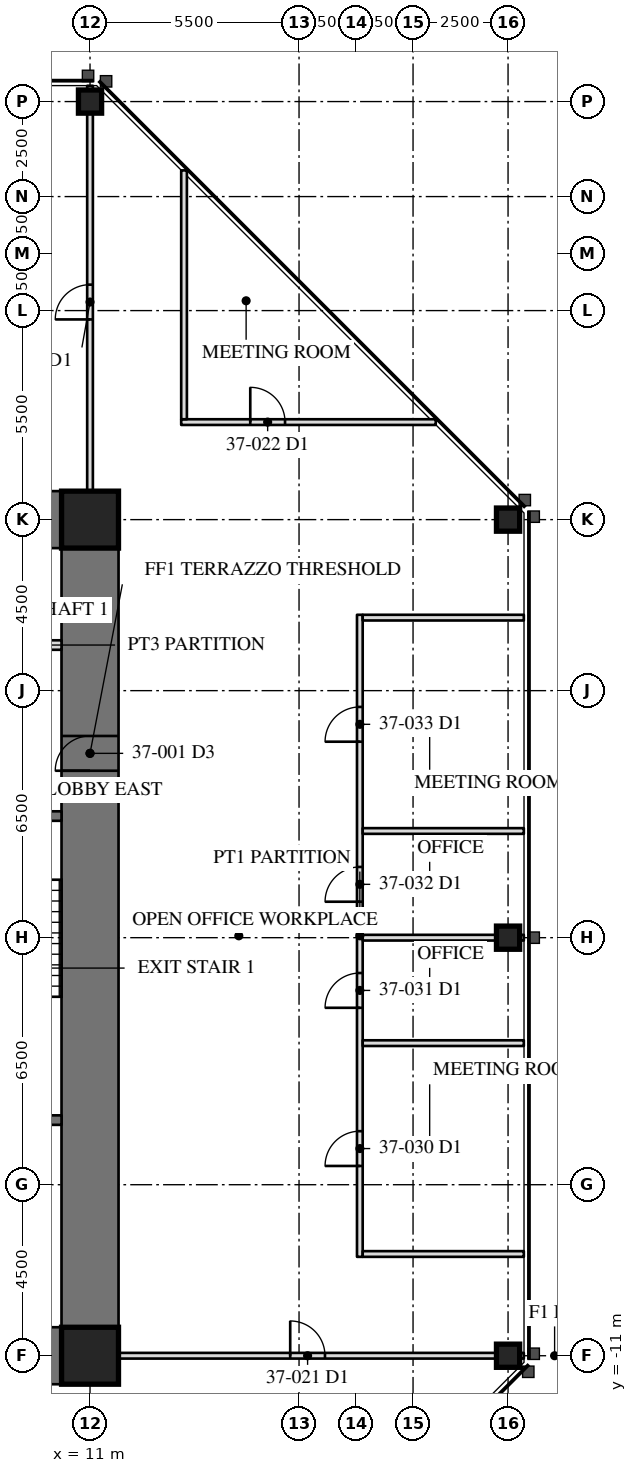
"""IFC4 building model, lengths in metres.
Left out: names, types, materials, properties, quantities, classifications, styles, units other than length and angle.
Written with IfcOpenShell. Run it as: python <this file> out.ifc"""

import sys

from ifc_helpers import new_model, si_unit, direction, frame, frame_2d, origin, origin_2d, place, context, subcontext, project, spatial, rectangle, hollow_rectangle, extrude, element, fill, save


model = new_model("IFC4")
c1 = context("Model", 3, precision=1e-05, world=origin(), true_north=direction((0.0, 1.0)))
c2 = subcontext(c1, "Body", "Model", "MODEL_VIEW")
j1 = project(units=[si_unit("LENGTHUNIT", "METRE"), si_unit("PLANEANGLEUNIT", "RADIAN")], contexts=[c1])
p1 = place(None, origin())
s1 = spatial("IfcSite", under=j1, at=p1, CompositionType="ELEMENT")
p2 = place(p1, origin())
s2 = spatial("IfcBuilding", under=s1, at=p2, CompositionType="ELEMENT")
p3 = place(p2, frame((0.0, 0.0, 158.2)))
s3 = spatial("IfcBuildingStorey", under=s2, at=p3, CompositionType="ELEMENT", Elevation=158.2)
for number, where, z_axis, x_axis in (
    (1, (22.0, -11.0, 0.0), (0.0, 0.0, 1.0), (0.0, 1.0, 0.0)),
    (2, (22.0, 0.0, 0.0), (0.0, 0.0, 1.0), (0.0, 1.0, 0.0)),
    (3, (22.0, 11.0, 0.0), (0.0, 0.0, 1.0), (0.0, 1.0, 0.0)),
    (4, (11.0, 22.0, 0.0), (0.0, 0.0, 1.0), (1.0, 0.0, 0.0)),
):
    element("IfcColumn", number, at=place(p3, frame(where, z_axis=z_axis, x_axis=x_axis)), inside=s3, PredefinedType="COLUMN", context=c2, shape_type="SweptSolid", body=[
        extrude(hollow_rectangle(XDim=0.61, YDim=0.61, WallThickness=0.076, at=origin_2d()), origin(), (0.0, 0.0, 1.0), 4.1),
    ])
p4 = place(p3, frame((11.0, -11.0, 0.0), z_axis=(0.0, 0.0, 1.0), x_axis=(0.0, 1.0, 0.0)))
e5 = element("IfcWall", 5, at=p4, inside=s3, PredefinedType="SHEAR", context=c2, shape_type="SweptSolid", body=[
    extrude(rectangle(XDim=22.0, YDim=1.5, at=frame_2d((11.0, 0.0))), origin(), (0.0, 0.0, 1.0), 4.1),
])
p5 = place(p4, frame((15.393, 0.0, 0.0)))
e6 = element("IfcOpeningElement", 6, at=p5, cuts=e5, PredefinedType="OPENING", context=c2, shape_type="SweptSolid", body=[
    extrude(rectangle(XDim=0.915, YDim=2.134, at=frame_2d((0.458, 1.067))), frame((0.0, 0.76, 0.0), z_axis=(0.0, -1.0, 0.0), x_axis=(1.0, 0.0, 0.0)), (0.0, 0.0, 1.0), 1.52),
])
for number, where, z_axis, x_axis in (
    (7, (11.0, 11.0, 0.0), (0.0, 0.0, 1.0), (-1.0, 0.0, 0.0)),
    (8, (6.5, -11.0, 0.0), (0.0, 0.0, 1.0), (1.0, 0.0, 0.0)),
):
    element("IfcWall", number, at=place(p3, frame(where, z_axis=z_axis, x_axis=x_axis)), inside=s3, PredefinedType="SHEAR", context=c2, shape_type="SweptSolid", body=[
        extrude(rectangle(XDim=4.5, YDim=1.5, at=frame_2d((2.25, 0.0))), origin(), (0.0, 0.0, 1.0), 4.1),
    ])
for number, where, z_axis, x_axis in (
    (9, (11.0, 11.0, 0.0), (0.0, 0.0, 1.0), (1.0, 0.0, 0.0)),
    (10, (11.0, -11.0, 0.0), (0.0, 0.0, 1.0), (1.0, 0.0, 0.0)),
):
    element("IfcColumn", number, at=place(p3, frame(where, z_axis=z_axis, x_axis=x_axis)), inside=s3, PredefinedType="COLUMN", context=c2, shape_type="SweptSolid", body=[
        extrude(hollow_rectangle(XDim=1.499, YDim=1.499, WallThickness=0.102, at=origin_2d()), origin(), (0.0, 0.0, 1.0), 4.1),
    ])
p6 = place(p3, frame((6.95, -4.8, 0.0), z_axis=(0.0, 0.0, 1.0), x_axis=(1.0, 0.0, 0.0)))
e11 = element("IfcWall", 11, at=p6, inside=s3, PredefinedType="SOLIDWALL", context=c2, shape_type="SweptSolid", body=[
    extrude(rectangle(XDim=3.3, YDim=0.25, at=frame_2d((1.65, 0.0))), origin(), (0.0, 0.0, 1.0), 3.91),
])
p7 = place(p3, frame((6.95, 3.2, 0.0), z_axis=(0.0, 0.0, 1.0), x_axis=(1.0, 0.0, 0.0)))
e12 = element("IfcWall", 12, at=p7, inside=s3, PredefinedType="SOLIDWALL", context=c2, shape_type="SweptSolid", body=[
    extrude(rectangle(XDim=3.3, YDim=0.25, at=frame_2d((1.65, 0.0))), origin(), (0.0, 0.0, 1.0), 3.91),
])
p8 = place(p7, frame((1.116, 0.0, 0.0)))
e13 = element("IfcOpeningElement", 13, at=p8, cuts=e12, PredefinedType="OPENING", context=c2, shape_type="SweptSolid", body=[
    extrude(rectangle(XDim=1.067, YDim=2.134, at=frame_2d((0.533, 1.067))), frame((0.0, 0.135, 0.0), z_axis=(0.0, -1.0, 0.0), x_axis=(1.0, 0.0, 0.0)), (0.0, 0.0, 1.0), 0.27),
])
p9 = place(p3, frame((6.95, 7.7, 0.0), z_axis=(0.0, 0.0, 1.0), x_axis=(1.0, 0.0, 0.0)))
e14 = element("IfcWall", 14, at=p9, inside=s3, PredefinedType="PARTITIONING", context=c2, shape_type="SweptSolid", body=[
    extrude(rectangle(XDim=3.3, YDim=0.25, at=frame_2d((1.65, 0.0))), origin(), (0.0, 0.0, 1.0), 3.91),
])
p10 = place(p9, frame((0.45, 0.0, 0.0)))
e15 = element("IfcOpeningElement", 15, at=p10, cuts=e14, PredefinedType="OPENING", context=c2, shape_type="SweptSolid", body=[
    extrude(rectangle(XDim=1.219, YDim=2.134, at=frame_2d((0.609, 1.067))), frame((0.0, 0.135, 0.0), z_axis=(0.0, -1.0, 0.0), x_axis=(1.0, 0.0, 0.0)), (0.0, 0.0, 1.0), 0.27),
])
p11 = place(p3, frame((11.0, 11.75, 0.0), z_axis=(0.0, 0.0, 1.0), x_axis=(0.0, 1.0, 0.0)))
e16 = element("IfcWall", 16, at=p11, inside=s3, PredefinedType="PARTITIONING", context=c2, shape_type="SweptSolid", body=[
    extrude(rectangle(XDim=10.665, YDim=0.15, at=frame_2d((5.333, 0.0))), origin(), (0.0, 0.0, 1.0), 3.326),
])
p12 = place(p11, frame((4.518, 0.0, 0.0)))
e17 = element("IfcOpeningElement", 17, at=p12, cuts=e16, PredefinedType="OPENING", context=c2, shape_type="SweptSolid", body=[
    extrude(rectangle(XDim=0.915, YDim=2.134, at=frame_2d((0.458, 1.067))), frame((0.0, 0.085, 0.0), z_axis=(0.0, -1.0, 0.0), x_axis=(1.0, 0.0, 0.0)), (0.0, 0.0, 1.0), 0.17),
])
p13 = place(p3, frame((11.75, -11.0, 0.0), z_axis=(0.0, 0.0, 1.0), x_axis=(1.0, 0.0, 0.0)))
e18 = element("IfcWall", 18, at=p13, inside=s3, PredefinedType="PARTITIONING", context=c2, shape_type="SweptSolid", body=[
    extrude(rectangle(XDim=10.665, YDim=0.15, at=frame_2d((5.333, 0.0))), origin(), (0.0, 0.0, 1.0), 3.326),
])
p14 = place(p13, frame((4.518, 0.0, 0.0)))
e19 = element("IfcOpeningElement", 19, at=p14, cuts=e18, PredefinedType="OPENING", context=c2, shape_type="SweptSolid", body=[
    extrude(rectangle(XDim=0.915, YDim=2.134, at=frame_2d((0.458, 1.067))), frame((0.0, 0.085, 0.0), z_axis=(0.0, -1.0, 0.0), x_axis=(1.0, 0.0, 0.0)), (0.0, 0.0, 1.0), 0.17),
])
p15 = place(p3, frame((13.399, 13.566, 0.0), z_axis=(0.0, 0.0, 1.0), x_axis=(1.0, 0.0, 0.0)))
e20 = element("IfcWall", 20, at=p15, inside=s3, PredefinedType="PARTITIONING", context=c2, shape_type="SweptSolid", body=[
    extrude(rectangle(XDim=6.698, YDim=0.15, at=frame_2d((3.349, 0.0))), origin(), (0.0, 0.0, 1.0), 3.91),
])
p16 = place(p15, frame((1.817, 0.0, 0.0)))
e21 = element("IfcOpeningElement", 21, at=p16, cuts=e20, PredefinedType="OPENING", context=c2, shape_type="SweptSolid", body=[
    extrude(rectangle(XDim=0.915, YDim=2.134, at=frame_2d((0.458, 1.067))), frame((0.0, 0.085, 0.0), z_axis=(0.0, -1.0, 0.0), x_axis=(1.0, 0.0, 0.0)), (0.0, 0.0, 1.0), 0.17),
])
p17 = place(p3, frame((13.474, 13.641, 0.0), z_axis=(0.0, 0.0, 1.0), x_axis=(0.0, 1.0, 0.0)))
e22 = element("IfcWall", 22, at=p17, inside=s3, PredefinedType="PARTITIONING", context=c2, shape_type="SweptSolid", body=[
    extrude(rectangle(XDim=6.548, YDim=0.15, at=frame_2d((3.274, 0.0))), origin(), (0.0, 0.0, 1.0), 3.91),
])
p18 = place(p3, frame((18.1, -8.398, 0.0), z_axis=(0.0, 0.0, 1.0), x_axis=(0.0, 1.0, 0.0)))
e23 = element("IfcWall", 23, at=p18, inside=s3, PredefinedType="PARTITIONING", context=c2, shape_type="SweptSolid", body=[
    extrude(rectangle(XDim=16.894, YDim=0.15, at=frame_2d((8.447, 0.0))), origin(), (0.0, 0.0, 1.0), 3.91),
])
p19 = place(p18, frame((2.392, 0.0, 0.0)))
e24 = element("IfcOpeningElement", 24, at=p19, cuts=e23, PredefinedType="OPENING", context=c2, shape_type="SweptSolid", body=[
    extrude(rectangle(XDim=0.915, YDim=2.134, at=frame_2d((0.458, 1.067))), frame((0.0, 0.085, 0.0), z_axis=(0.0, -1.0, 0.0), x_axis=(1.0, 0.0, 0.0)), (0.0, 0.0, 1.0), 0.17),
])
p20 = place(p18, frame((6.553, 0.0, 0.0)))
e25 = element("IfcOpeningElement", 25, at=p20, cuts=e23, PredefinedType="OPENING", context=c2, shape_type="SweptSolid", body=[
    extrude(rectangle(XDim=0.915, YDim=2.134, at=frame_2d((0.458, 1.067))), frame((0.0, 0.085, 0.0), z_axis=(0.0, -1.0, 0.0), x_axis=(1.0, 0.0, 0.0)), (0.0, 0.0, 1.0), 0.17),
])
p21 = place(p18, frame((9.344, 0.0, 0.0)))
e26 = element("IfcOpeningElement", 26, at=p21, cuts=e23, PredefinedType="OPENING", context=c2, shape_type="SweptSolid", body=[
    extrude(rectangle(XDim=0.915, YDim=2.134, at=frame_2d((0.458, 1.067))), frame((0.0, 0.085, 0.0), z_axis=(0.0, -1.0, 0.0), x_axis=(1.0, 0.0, 0.0)), (0.0, 0.0, 1.0), 0.17),
])
p22 = place(p18, frame((13.554, 0.0, 0.0)))
e27 = element("IfcOpeningElement", 27, at=p22, cuts=e23, PredefinedType="OPENING", context=c2, shape_type="SweptSolid", body=[
    extrude(rectangle(XDim=0.915, YDim=2.134, at=frame_2d((0.458, 1.067))), frame((0.0, 0.085, 0.0), z_axis=(0.0, -1.0, 0.0), x_axis=(1.0, 0.0, 0.0)), (0.0, 0.0, 1.0), 0.17),
])
for number, where, z_axis, x_axis in (
    (28, (18.175, -8.323, 0.0), (0.0, 0.0, 1.0), (1.0, 0.0, 0.0)),
    (29, (18.175, -2.775, 0.0), (0.0, 0.0, 1.0), (1.0, 0.0, 0.0)),
):
    element("IfcWall", number, at=place(p3, frame(where, z_axis=z_axis, x_axis=x_axis)), inside=s3, PredefinedType="PARTITIONING", context=c2, shape_type="SweptSolid", body=[
        extrude(rectangle(XDim=4.24, YDim=0.15, at=frame_2d((2.12, 0.0))), origin(), (0.0, 0.0, 1.0), 3.91),
    ])
p23 = place(p3, frame((18.175, 0.0, 0.0), z_axis=(0.0, 0.0, 1.0), x_axis=(1.0, 0.0, 0.0)))
e30 = element("IfcWall", 30, at=p23, inside=s3, PredefinedType="PARTITIONING", context=c2, shape_type="SweptSolid", body=[
    extrude(rectangle(XDim=4.24, YDim=0.15, at=frame_2d((2.12, 0.0))), origin(), (0.0, 0.0, 1.0), 3.326),
])
for number, where, z_axis, x_axis in (
    (31, (18.175, 2.807, 0.0), (0.0, 0.0, 1.0), (1.0, 0.0, 0.0)),
    (32, (18.175, 8.421, 0.0), (0.0, 0.0, 1.0), (1.0, 0.0, 0.0)),
):
    element("IfcWall", number, at=place(p3, frame(where, z_axis=z_axis, x_axis=x_axis)), inside=s3, PredefinedType="PARTITIONING", context=c2, shape_type="SweptSolid", body=[
        extrude(rectangle(XDim=4.24, YDim=0.15, at=frame_2d((2.12, 0.0))), origin(), (0.0, 0.0, 1.0), 3.91),
    ])
p24 = place(p5, origin())
e33 = element("IfcDoor", 33, at=p24, inside=s3, OperationType="SINGLE_SWING_RIGHT", PredefinedType="DOOR", context=c2, shape_type="SweptSolid", body=[
    extrude(rectangle(XDim=0.915, YDim=2.134, at=frame_2d((0.458, 1.067))), frame((0.0, -0.675, 0.0), z_axis=(0.0, -1.0, 0.0), x_axis=(1.0, 0.0, 0.0)), (0.0, 0.0, 1.0), 0.05),
])
fill(e6, e33)
p25 = place(p12, origin())
e34 = element("IfcDoor", 34, at=p25, inside=s3, OperationType="SINGLE_SWING_LEFT", PredefinedType="DOOR", context=c2, shape_type="SweptSolid", body=[
    extrude(rectangle(XDim=0.915, YDim=2.134, at=frame_2d((0.458, 1.067))), frame((0.0, 0.025, 0.0), z_axis=(0.0, -1.0, 0.0), x_axis=(1.0, 0.0, 0.0)), (0.0, 0.0, 1.0), 0.05),
])
fill(e17, e34)
p26 = place(p14, origin())
e35 = element("IfcDoor", 35, at=p26, inside=s3, OperationType="SINGLE_SWING_LEFT", PredefinedType="DOOR", context=c2, shape_type="SweptSolid", body=[
    extrude(rectangle(XDim=0.915, YDim=2.134, at=frame_2d((0.458, 1.067))), frame((0.0, 0.025, 0.0), z_axis=(0.0, -1.0, 0.0), x_axis=(1.0, 0.0, 0.0)), (0.0, 0.0, 1.0), 0.05),
])
fill(e19, e35)
p27 = place(p16, origin())
e36 = element("IfcDoor", 36, at=p27, inside=s3, OperationType="SINGLE_SWING_LEFT", PredefinedType="DOOR", context=c2, shape_type="SweptSolid", body=[
    extrude(rectangle(XDim=0.915, YDim=2.134, at=frame_2d((0.458, 1.067))), frame((0.0, 0.025, 0.0), z_axis=(0.0, -1.0, 0.0), x_axis=(1.0, 0.0, 0.0)), (0.0, 0.0, 1.0), 0.05),
])
fill(e21, e36)
p28 = place(p19, origin())
e37 = element("IfcDoor", 37, at=p28, inside=s3, OperationType="SINGLE_SWING_LEFT", PredefinedType="DOOR", context=c2, shape_type="SweptSolid", body=[
    extrude(rectangle(XDim=0.915, YDim=2.134, at=frame_2d((0.458, 1.067))), frame((0.0, 0.025, 0.0), z_axis=(0.0, -1.0, 0.0), x_axis=(1.0, 0.0, 0.0)), (0.0, 0.0, 1.0), 0.05),
])
fill(e24, e37)
p29 = place(p20, origin())
e38 = element("IfcDoor", 38, at=p29, inside=s3, OperationType="SINGLE_SWING_LEFT", PredefinedType="DOOR", context=c2, shape_type="SweptSolid", body=[
    extrude(rectangle(XDim=0.915, YDim=2.134, at=frame_2d((0.458, 1.067))), frame((0.0, 0.025, 0.0), z_axis=(0.0, -1.0, 0.0), x_axis=(1.0, 0.0, 0.0)), (0.0, 0.0, 1.0), 0.05),
])
fill(e25, e38)
p30 = place(p21, origin())
e39 = element("IfcDoor", 39, at=p30, inside=s3, OperationType="SINGLE_SWING_LEFT", PredefinedType="DOOR", context=c2, shape_type="SweptSolid", body=[
    extrude(rectangle(XDim=0.915, YDim=2.134, at=frame_2d((0.458, 1.067))), frame((0.0, 0.025, 0.0), z_axis=(0.0, -1.0, 0.0), x_axis=(1.0, 0.0, 0.0)), (0.0, 0.0, 1.0), 0.05),
])
fill(e26, e39)
p31 = place(p22, origin())
e40 = element("IfcDoor", 40, at=p31, inside=s3, OperationType="SINGLE_SWING_LEFT", PredefinedType="DOOR", context=c2, shape_type="SweptSolid", body=[
    extrude(rectangle(XDim=0.915, YDim=2.134, at=frame_2d((0.458, 1.067))), frame((0.0, 0.025, 0.0), z_axis=(0.0, -1.0, 0.0), x_axis=(1.0, 0.0, 0.0)), (0.0, 0.0, 1.0), 0.05),
])
fill(e27, e40)
save(model, sys.argv[1])
